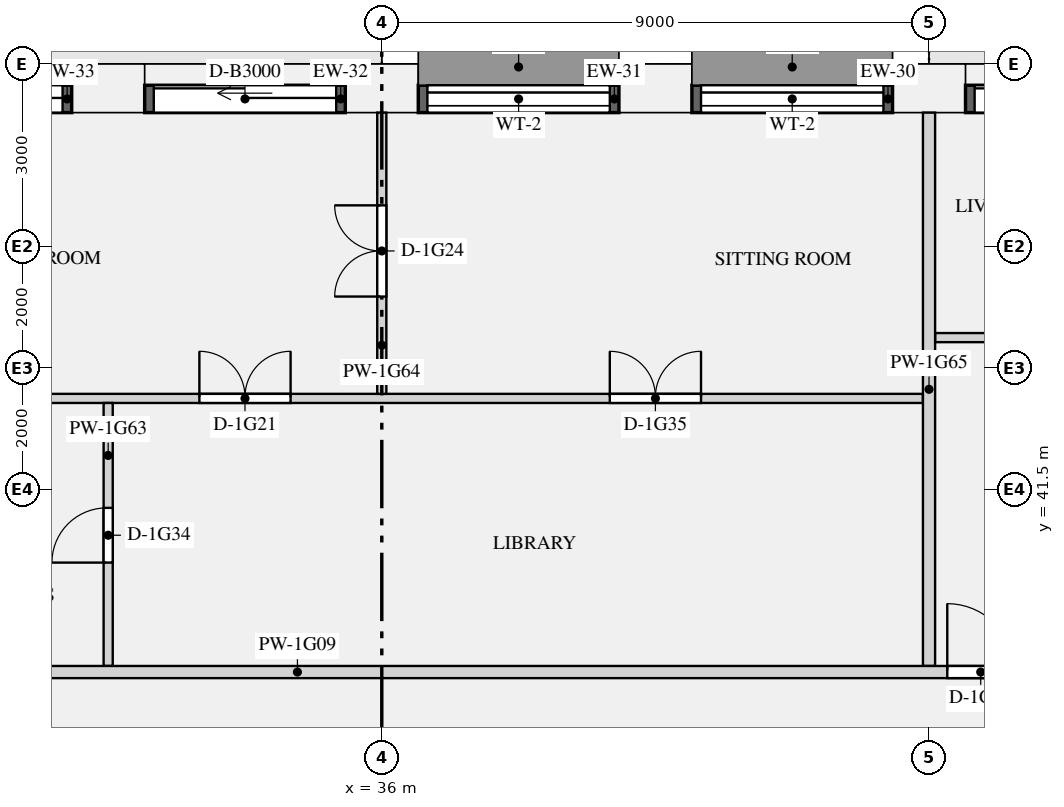
"""IFC4 building model, lengths in metres.
Left out: names, types, materials, properties, quantities, classifications, styles, units other than length and angle.
Written with IfcOpenShell. Run it as: python <this file> out.ifc"""

import sys

from ifc_helpers import new_model, si_unit, direction, frame, frame_2d, origin, origin_2d, place, context, subcontext, project, spatial, rectangle, extrude, element, fill, save


model = new_model("IFC4")
c1 = context("Model", 3, precision=1e-05, world=origin(), true_north=direction((0.0, 1.0)))
c2 = subcontext(c1, "Body", "Model", "MODEL_VIEW")
j1 = project(units=[si_unit("LENGTHUNIT", "METRE"), si_unit("PLANEANGLEUNIT", "RADIAN")], contexts=[c1])
p1 = place(None, origin())
s1 = spatial("IfcSite", under=j1, at=p1, CompositionType="ELEMENT")
p2 = place(p1, origin())
s2 = spatial("IfcBuilding", under=s1, at=p2, CompositionType="ELEMENT")
p3 = place(p2, frame((0.0, 0.0, 69.9)))
s3 = spatial("IfcBuildingStorey", under=s2, at=p3, CompositionType="ELEMENT", Elevation=69.9)
for number, where, z_axis, x_axis in (
    (1, (45.0, 48.1, 0.0), (0.0, 0.0, 1.0), (-1.0, 0.0, 0.0)),
    (2, (40.5, 48.1, 0.0), (0.0, 0.0, 1.0), (-1.0, 0.0, 0.0)),
    (3, (36.0, 48.1, 0.0), (0.0, 0.0, 1.0), (-1.0, 0.0, 0.0)),
    (4, (31.5, 48.1, 0.0), (0.0, 0.0, 1.0), (-1.0, 0.0, 0.0)),
):
    element("IfcColumn", number, at=place(p3, frame(where, z_axis=z_axis, x_axis=x_axis)), inside=s3, PredefinedType="USERDEFINED", context=c2, shape_type="SweptSolid", body=[
        extrude(rectangle(XDim=1.2, YDim=0.8, at=origin_2d()), origin(), (0.0, 0.0, 1.0), 2.65),
    ])
p4 = place(p3, frame((48.9, 47.925, 0.0), z_axis=(0.0, 0.0, 1.0), x_axis=(-1.0, 0.0, 0.0)))
e5 = element("IfcWall", 5, at=p4, inside=s3, PredefinedType="SOLIDWALL", context=c2, shape_type="SweptSolid", body=[
    extrude(rectangle(XDim=3.3, YDim=0.45, at=frame_2d((1.65, 0.0))), origin(), (0.0, 0.0, 1.0), 2.65),
])
p5 = place(p4, frame((0.15, 0.0, 0.0)))
e6 = element("IfcOpeningElement", 6, at=p5, cuts=e5, PredefinedType="OPENING", context=c2, shape_type="SweptSolid", body=[
    extrude(rectangle(XDim=3.0, YDim=2.3, at=frame_2d((1.5, 1.15))), frame((0.0, 0.235, 0.0), z_axis=(0.0, -1.0, 0.0), x_axis=(1.0, 0.0, 0.0)), (0.0, 0.0, 1.0), 0.47),
])
p6 = place(p3, frame((44.4, 47.925, 0.9), z_axis=(0.0, 0.0, 1.0), x_axis=(-1.0, 0.0, 0.0)))
e7 = element("IfcWall", 7, at=p6, inside=s3, PredefinedType="SOLIDWALL", context=c2, shape_type="SweptSolid", body=[
    extrude(rectangle(XDim=3.3, YDim=0.45, at=frame_2d((1.65, 0.0))), origin(), (0.0, 0.0, 1.0), 1.75),
])
p7 = place(p6, frame((0.15, 0.0, 0.15)))
e8 = element("IfcOpeningElement", 8, at=p7, cuts=e7, PredefinedType="OPENING", context=c2, shape_type="SweptSolid", body=[
    extrude(rectangle(XDim=3.0, YDim=1.5, at=frame_2d((1.5, 0.75))), frame((0.0, 0.235, 0.0), z_axis=(0.0, -1.0, 0.0), x_axis=(1.0, 0.0, 0.0)), (0.0, 0.0, 1.0), 0.47),
])
p8 = place(p3, frame((39.9, 47.925, 0.9), z_axis=(0.0, 0.0, 1.0), x_axis=(-1.0, 0.0, 0.0)))
e9 = element("IfcWall", 9, at=p8, inside=s3, PredefinedType="SOLIDWALL", context=c2, shape_type="SweptSolid", body=[
    extrude(rectangle(XDim=3.3, YDim=0.45, at=frame_2d((1.65, 0.0))), origin(), (0.0, 0.0, 1.0), 1.75),
])
p9 = place(p8, frame((0.15, 0.0, 0.15)))
e10 = element("IfcOpeningElement", 10, at=p9, cuts=e9, PredefinedType="OPENING", context=c2, shape_type="SweptSolid", body=[
    extrude(rectangle(XDim=3.0, YDim=1.5, at=frame_2d((1.5, 0.75))), frame((0.0, 0.235, 0.0), z_axis=(0.0, -1.0, 0.0), x_axis=(1.0, 0.0, 0.0)), (0.0, 0.0, 1.0), 0.47),
])
p10 = place(p3, frame((35.4, 47.925, 0.0), z_axis=(0.0, 0.0, 1.0), x_axis=(-1.0, 0.0, 0.0)))
e11 = element("IfcWall", 11, at=p10, inside=s3, PredefinedType="SOLIDWALL", context=c2, shape_type="SweptSolid", body=[
    extrude(rectangle(XDim=3.3, YDim=0.45, at=frame_2d((1.65, 0.0))), origin(), (0.0, 0.0, 1.0), 2.65),
])
p11 = place(p10, frame((0.15, 0.0, 0.0)))
e12 = element("IfcOpeningElement", 12, at=p11, cuts=e11, PredefinedType="OPENING", context=c2, shape_type="SweptSolid", body=[
    extrude(rectangle(XDim=3.0, YDim=2.3, at=frame_2d((1.5, 1.15))), frame((0.0, 0.235, 0.0), z_axis=(0.0, -1.0, 0.0), x_axis=(1.0, 0.0, 0.0)), (0.0, 0.0, 1.0), 0.47),
])
p12 = place(p3, frame((30.9, 47.925, 0.0), z_axis=(0.0, 0.0, 1.0), x_axis=(-1.0, 0.0, 0.0)))
e13 = element("IfcWall", 13, at=p12, inside=s3, PredefinedType="SOLIDWALL", context=c2, shape_type="SweptSolid", body=[
    extrude(rectangle(XDim=3.3, YDim=0.45, at=frame_2d((1.65, 0.0))), origin(), (0.0, 0.0, 1.0), 2.65),
])
p13 = place(p12, frame((0.15, 0.0, 0.0)))
e14 = element("IfcOpeningElement", 14, at=p13, cuts=e13, PredefinedType="OPENING", context=c2, shape_type="SweptSolid", body=[
    extrude(rectangle(XDim=3.0, YDim=2.3, at=frame_2d((1.5, 1.15))), frame((0.0, 0.235, 0.0), z_axis=(0.0, -1.0, 0.0), x_axis=(1.0, 0.0, 0.0)), (0.0, 0.0, 1.0), 0.47),
])
p14 = place(p3, frame((23.925, 38.5, 0.0), z_axis=(0.0, 0.0, 1.0), x_axis=(1.0, 0.0, 0.0)))
e15 = element("IfcWall", 15, at=p14, inside=s3, PredefinedType="PARTITIONING", context=c2, shape_type="SweptSolid", body=[
    extrude(rectangle(XDim=24.175, YDim=0.2, at=frame_2d((12.087, 0.0))), origin(), (0.0, 0.0, 1.0), 2.65),
])
p15 = place(p14, frame((21.375, 0.0, 0.0)))
e16 = element("IfcOpeningElement", 16, at=p15, cuts=e15, PredefinedType="OPENING", context=c2, shape_type="SweptSolid", body=[
    extrude(rectangle(XDim=1.1, YDim=2.1, at=frame_2d((0.55, 1.05))), frame((0.0, 0.11, 0.0), z_axis=(0.0, -1.0, 0.0), x_axis=(1.0, 0.0, 0.0)), (0.0, 0.0, 1.0), 0.22),
])
p16 = place(p3, frame((18.075, 43.0, 0.0), z_axis=(0.0, 0.0, 1.0), x_axis=(1.0, 0.0, 0.0)))
e17 = element("IfcWall", 17, at=p16, inside=s3, PredefinedType="PARTITIONING", context=c2, shape_type="SweptSolid", body=[
    extrude(rectangle(XDim=26.825, YDim=0.15, at=frame_2d((13.413, 0.0))), origin(), (0.0, 0.0, 1.0), 2.65),
])
p17 = place(p16, frame((14.925, 0.0, 0.0)))
e18 = element("IfcOpeningElement", 18, at=p17, cuts=e17, PredefinedType="OPENING", context=c2, shape_type="SweptSolid", body=[
    extrude(rectangle(XDim=1.5, YDim=2.1, at=frame_2d((0.75, 1.05))), frame((0.0, 0.085, 0.0), z_axis=(0.0, -1.0, 0.0), x_axis=(1.0, 0.0, 0.0)), (0.0, 0.0, 1.0), 0.17),
])
p18 = place(p16, frame((11.475, 0.0, 0.0)))
e19 = element("IfcOpeningElement", 19, at=p18, cuts=e17, PredefinedType="OPENING", context=c2, shape_type="SweptSolid", body=[
    extrude(rectangle(XDim=0.9, YDim=2.1, at=frame_2d((0.45, 1.05))), frame((0.0, 0.085, 0.0), z_axis=(0.0, -1.0, 0.0), x_axis=(1.0, 0.0, 0.0)), (0.0, 0.0, 1.0), 0.17),
])
p19 = place(p16, frame((2.475, 0.0, 0.0)))
e20 = element("IfcOpeningElement", 20, at=p19, cuts=e17, PredefinedType="OPENING", context=c2, shape_type="SweptSolid", body=[
    extrude(rectangle(XDim=0.9, YDim=2.1, at=frame_2d((0.45, 1.05))), frame((0.0, 0.085, 0.0), z_axis=(0.0, -1.0, 0.0), x_axis=(1.0, 0.0, 0.0)), (0.0, 0.0, 1.0), 0.17),
])
p20 = place(p16, frame((21.675, 0.0, 0.0)))
e21 = element("IfcOpeningElement", 21, at=p20, cuts=e17, PredefinedType="OPENING", context=c2, shape_type="SweptSolid", body=[
    extrude(rectangle(XDim=1.5, YDim=2.1, at=frame_2d((0.75, 1.05))), frame((0.0, 0.085, 0.0), z_axis=(0.0, -1.0, 0.0), x_axis=(1.0, 0.0, 0.0)), (0.0, 0.0, 1.0), 0.17),
])
p21 = place(p3, frame((45.1, 44.0, 0.0), z_axis=(0.0, 0.0, 1.0), x_axis=(1.0, 0.0, 0.0)))
e22 = element("IfcWall", 22, at=p21, inside=s3, PredefinedType="PARTITIONING", context=c2, shape_type="SweptSolid", body=[
    extrude(rectangle(XDim=8.825, YDim=0.15, at=frame_2d((4.413, 0.0))), origin(), (0.0, 0.0, 1.0), 2.65),
])
p22 = place(p21, frame((6.2, 0.0, 0.0)))
e23 = element("IfcOpeningElement", 23, at=p22, cuts=e22, PredefinedType="OPENING", context=c2, shape_type="SweptSolid", body=[
    extrude(rectangle(XDim=0.9, YDim=2.1, at=frame_2d((0.45, 1.05))), frame((0.0, 0.085, 0.0), z_axis=(0.0, -1.0, 0.0), x_axis=(1.0, 0.0, 0.0)), (0.0, 0.0, 1.0), 0.17),
])
p23 = place(p21, frame((1.7, 0.0, 0.0)))
e24 = element("IfcOpeningElement", 24, at=p23, cuts=e22, PredefinedType="OPENING", context=c2, shape_type="SweptSolid", body=[
    extrude(rectangle(XDim=0.9, YDim=2.1, at=frame_2d((0.45, 1.05))), frame((0.0, 0.085, 0.0), z_axis=(0.0, -1.0, 0.0), x_axis=(1.0, 0.0, 0.0)), (0.0, 0.0, 1.0), 0.17),
])
p24 = place(p3, frame((31.5, 38.6, 0.0), z_axis=(0.0, 0.0, 1.0), x_axis=(0.0, 1.0, 0.0)))
e25 = element("IfcWall", 25, at=p24, inside=s3, PredefinedType="PARTITIONING", context=c2, shape_type="SweptSolid", body=[
    extrude(rectangle(XDim=4.325, YDim=0.15, at=frame_2d((2.163, 0.0))), origin(), (0.0, 0.0, 1.0), 2.65),
])
p25 = place(p24, frame((1.7, 0.0, 0.0)))
e26 = element("IfcOpeningElement", 26, at=p25, cuts=e25, PredefinedType="OPENING", context=c2, shape_type="SweptSolid", body=[
    extrude(rectangle(XDim=0.9, YDim=2.1, at=frame_2d((0.45, 1.05))), frame((0.0, 0.085, 0.0), z_axis=(0.0, -1.0, 0.0), x_axis=(1.0, 0.0, 0.0)), (0.0, 0.0, 1.0), 0.17),
])
p26 = place(p3, frame((36.0, 43.075, 0.0), z_axis=(0.0, 0.0, 1.0), x_axis=(0.0, 1.0, 0.0)))
e27 = element("IfcWall", 27, at=p26, inside=s3, PredefinedType="PARTITIONING", context=c2, shape_type="SweptSolid", body=[
    extrude(rectangle(XDim=4.625, YDim=0.15, at=frame_2d((2.312, 0.0))), origin(), (0.0, 0.0, 1.0), 2.65),
])
p27 = place(p26, frame((1.6, 0.0, 0.0)))
e28 = element("IfcOpeningElement", 28, at=p27, cuts=e27, PredefinedType="OPENING", context=c2, shape_type="SweptSolid", body=[
    extrude(rectangle(XDim=1.5, YDim=2.1, at=frame_2d((0.75, 1.05))), frame((0.0, 0.085, 0.0), z_axis=(0.0, -1.0, 0.0), x_axis=(1.0, 0.0, 0.0)), (0.0, 0.0, 1.0), 0.17),
])
p28 = place(p3, frame((45.0, 38.6, 0.0), z_axis=(0.0, 0.0, 1.0), x_axis=(0.0, 1.0, 0.0)))
e29 = element("IfcWall", 29, at=p28, inside=s3, PredefinedType="PARTITIONING", context=c2, shape_type="SweptSolid", body=[
    extrude(rectangle(XDim=9.1, YDim=0.2, at=frame_2d((4.55, 0.0))), origin(), (0.0, 0.0, 1.0), 2.65),
])
p29 = place(p5, origin())
e30 = element("IfcDoor", 30, at=p29, inside=s3, OperationType="SLIDING_TO_LEFT", PredefinedType="DOOR", context=c2, shape_type="SweptSolid", body=[
    extrude(rectangle(XDim=3.0, YDim=2.3, at=frame_2d((1.5, 1.15))), frame((0.0, -0.07, 0.0), z_axis=(0.0, -1.0, 0.0), x_axis=(1.0, 0.0, 0.0)), (0.0, 0.0, 1.0), 0.05),
])
fill(e6, e30)
p30 = place(p7, origin())
e31 = element("IfcWindow", 31, at=p30, inside=s3, PartitioningType="SINGLE_PANEL", PredefinedType="WINDOW", context=c2, shape_type="SweptSolid", body=[
    extrude(rectangle(XDim=3.0, YDim=1.5, at=frame_2d((1.5, 0.75))), frame((0.0, -0.065, 0.0), z_axis=(0.0, -1.0, 0.0), x_axis=(1.0, 0.0, 0.0)), (0.0, 0.0, 1.0), 0.06),
])
fill(e8, e31)
p31 = place(p9, origin())
e32 = element("IfcWindow", 32, at=p31, inside=s3, PartitioningType="SINGLE_PANEL", PredefinedType="WINDOW", context=c2, shape_type="SweptSolid", body=[
    extrude(rectangle(XDim=3.0, YDim=1.5, at=frame_2d((1.5, 0.75))), frame((0.0, -0.065, 0.0), z_axis=(0.0, -1.0, 0.0), x_axis=(1.0, 0.0, 0.0)), (0.0, 0.0, 1.0), 0.06),
])
fill(e10, e32)
p32 = place(p11, origin())
e33 = element("IfcDoor", 33, at=p32, inside=s3, OperationType="SLIDING_TO_LEFT", PredefinedType="DOOR", context=c2, shape_type="SweptSolid", body=[
    extrude(rectangle(XDim=3.0, YDim=2.3, at=frame_2d((1.5, 1.15))), frame((0.0, -0.07, 0.0), z_axis=(0.0, -1.0, 0.0), x_axis=(1.0, 0.0, 0.0)), (0.0, 0.0, 1.0), 0.05),
])
fill(e12, e33)
p33 = place(p13, origin())
e34 = element("IfcDoor", 34, at=p33, inside=s3, OperationType="SLIDING_TO_LEFT", PredefinedType="DOOR", context=c2, shape_type="SweptSolid", body=[
    extrude(rectangle(XDim=3.0, YDim=2.3, at=frame_2d((1.5, 1.15))), frame((0.0, -0.07, 0.0), z_axis=(0.0, -1.0, 0.0), x_axis=(1.0, 0.0, 0.0)), (0.0, 0.0, 1.0), 0.05),
])
fill(e14, e34)
p34 = place(p17, origin())
e35 = element("IfcDoor", 35, at=p34, inside=s3, OperationType="DOUBLE_DOOR_SINGLE_SWING", PredefinedType="DOOR", context=c2, shape_type="SweptSolid", body=[
    extrude(rectangle(XDim=1.5, YDim=2.1, at=frame_2d((0.75, 1.05))), frame((0.0, 0.025, 0.0), z_axis=(0.0, -1.0, 0.0), x_axis=(1.0, 0.0, 0.0)), (0.0, 0.0, 1.0), 0.05),
])
fill(e18, e35)
p35 = place(p27, origin())
e36 = element("IfcDoor", 36, at=p35, inside=s3, OperationType="DOUBLE_DOOR_SINGLE_SWING", PredefinedType="DOOR", context=c2, shape_type="SweptSolid", body=[
    extrude(rectangle(XDim=1.5, YDim=2.1, at=frame_2d((0.75, 1.05))), frame((0.0, 0.025, 0.0), z_axis=(0.0, -1.0, 0.0), x_axis=(1.0, 0.0, 0.0)), (0.0, 0.0, 1.0), 0.05),
])
fill(e28, e36)
p36 = place(p25, origin())
e37 = element("IfcDoor", 37, at=p36, inside=s3, OperationType="SINGLE_SWING_LEFT", PredefinedType="DOOR", context=c2, shape_type="SweptSolid", body=[
    extrude(rectangle(XDim=0.9, YDim=2.1, at=frame_2d((0.45, 1.05))), frame((0.0, 0.025, 0.0), z_axis=(0.0, -1.0, 0.0), x_axis=(1.0, 0.0, 0.0)), (0.0, 0.0, 1.0), 0.05),
])
fill(e26, e37)
p37 = place(p20, origin())
e38 = element("IfcDoor", 38, at=p37, inside=s3, OperationType="DOUBLE_DOOR_SINGLE_SWING", PredefinedType="DOOR", context=c2, shape_type="SweptSolid", body=[
    extrude(rectangle(XDim=1.5, YDim=2.1, at=frame_2d((0.75, 1.05))), frame((0.0, 0.025, 0.0), z_axis=(0.0, -1.0, 0.0), x_axis=(1.0, 0.0, 0.0)), (0.0, 0.0, 1.0), 0.05),
])
fill(e21, e38)
p38 = place(p15, origin())
e39 = element("IfcDoor", 39, at=p38, inside=s3, OperationType="SINGLE_SWING_LEFT", PredefinedType="DOOR", context=c2, shape_type="SweptSolid", body=[
    extrude(rectangle(XDim=1.1, YDim=2.1, at=frame_2d((0.55, 1.05))), frame((0.0, 0.025, 0.0), z_axis=(0.0, -1.0, 0.0), x_axis=(1.0, 0.0, 0.0)), (0.0, 0.0, 1.0), 0.05),
])
fill(e16, e39)
save(model, sys.argv[1])
